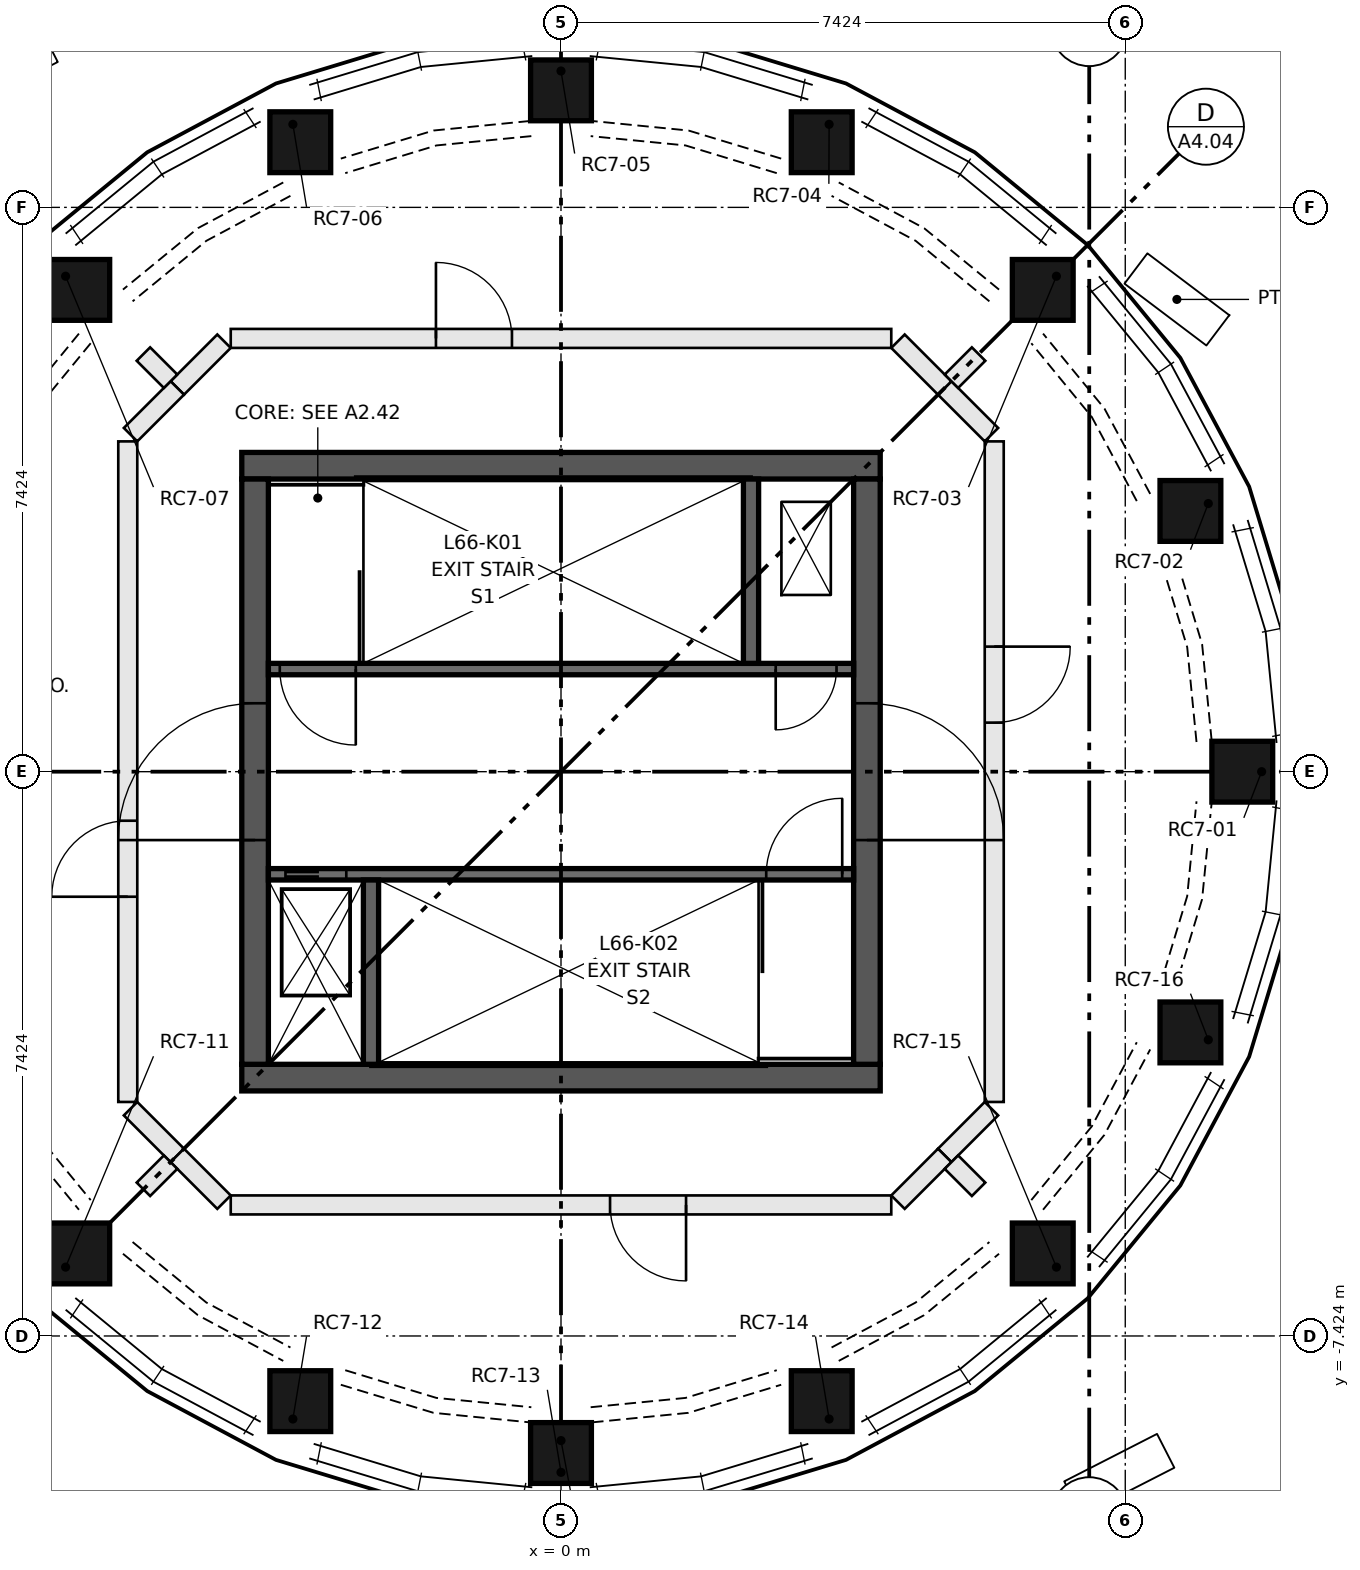
"""IFC4 building model, lengths in metres.
Left out: names, types, materials, properties, quantities, classifications, styles, units other than length and angle.
Written with IfcOpenShell. Run it as: python <this file> out.ifc"""

import sys

from ifc_helpers import new_model, si_unit, direction, frame, frame_2d, origin, origin_2d, place, context, subcontext, project, spatial, rectangle, extrude, element, fill, save


model = new_model("IFC4")
c1 = context("Model", 3, precision=1e-05, world=origin(), true_north=direction((0.0, 1.0)))
c2 = subcontext(c1, "Body", "Model", "MODEL_VIEW")
j1 = project(units=[si_unit("LENGTHUNIT", "METRE"), si_unit("PLANEANGLEUNIT", "RADIAN")], contexts=[c1])
p1 = place(None, origin())
s1 = spatial("IfcSite", under=j1, at=p1, CompositionType="ELEMENT")
p2 = place(p1, origin())
s2 = spatial("IfcBuilding", under=s1, at=p2, CompositionType="ELEMENT")
p3 = place(p2, frame((0.0, 0.0, 244.4)))
s3 = spatial("IfcBuildingStorey", under=s2, at=p3, CompositionType="ELEMENT", Elevation=244.4)
p4 = place(p3, frame((9.218, 0.0, 0.5), z_axis=(0.0, 0.0, 1.0), x_axis=(0.0, -1.0, 0.0)))
e1 = element("IfcColumn", 1, at=p4, inside=s3, PredefinedType="COLUMN", context=c2, shape_type="SweptSolid", body=[
    extrude(rectangle(XDim=0.8, YDim=0.8, at=origin_2d()), origin(), (0.0, -0.342, 0.94), 2.979),
])
p5 = place(p3, frame((8.517, 3.528, 0.5), z_axis=(0.0, 0.0, 1.0), x_axis=(0.38269062517, -0.923876553121, 0.0)))
e2 = element("IfcColumn", 2, at=p5, inside=s3, PredefinedType="COLUMN", context=c2, shape_type="SweptSolid", body=[
    extrude(rectangle(XDim=0.8, YDim=0.8, at=origin_2d()), origin(), (0.0, -0.342, 0.94), 2.979),
])
p6 = place(p3, frame((6.518, 6.518, 0.5), z_axis=(0.0, 0.0, 1.0), x_axis=(0.707106781187, -0.707106781187, 0.0)))
e3 = element("IfcColumn", 3, at=p6, inside=s3, PredefinedType="COLUMN", context=c2, shape_type="SweptSolid", body=[
    extrude(rectangle(XDim=0.8, YDim=0.8, at=origin_2d()), origin(), (0.0, -0.342, 0.94), 2.979),
])
p7 = place(p3, frame((3.528, 8.517, 0.5), z_axis=(0.0, 0.0, 1.0), x_axis=(0.923876553121, -0.38269062517, 0.0)))
e4 = element("IfcColumn", 4, at=p7, inside=s3, PredefinedType="COLUMN", context=c2, shape_type="SweptSolid", body=[
    extrude(rectangle(XDim=0.8, YDim=0.8, at=origin_2d()), origin(), (0.0, -0.342, 0.94), 2.979),
])
p8 = place(p3, frame((0.0, 9.218, 0.5), z_axis=(0.0, 0.0, 1.0), x_axis=(1.0, 0.0, 0.0)))
e5 = element("IfcColumn", 5, at=p8, inside=s3, PredefinedType="COLUMN", context=c2, shape_type="SweptSolid", body=[
    extrude(rectangle(XDim=0.8, YDim=0.8, at=origin_2d()), origin(), (0.0, -0.342, 0.94), 2.979),
])
p9 = place(p3, frame((-3.528, 8.517, 0.5), z_axis=(0.0, 0.0, 1.0), x_axis=(0.923876553121, 0.38269062517, 0.0)))
e6 = element("IfcColumn", 6, at=p9, inside=s3, PredefinedType="COLUMN", context=c2, shape_type="SweptSolid", body=[
    extrude(rectangle(XDim=0.8, YDim=0.8, at=origin_2d()), origin(), (0.0, -0.342, 0.94), 2.979),
])
for number, where, z_axis, x_axis in (
    (7, (-6.518, 6.518, 0.5), (0.0, 0.0, 1.0), (0.707, 0.707, 0.0)),
    (8, (-6.518, -6.518, 0.5), (0.0, 0.0, 1.0), (-0.707, 0.707, 0.0)),
):
    element("IfcColumn", number, at=place(p3, frame(where, z_axis=z_axis, x_axis=x_axis)), inside=s3, PredefinedType="COLUMN", context=c2, shape_type="SweptSolid", body=[
        extrude(rectangle(XDim=0.8, YDim=0.8, at=origin_2d()), origin(), (0.0, -0.342, 0.94), 2.979),
    ])
p10 = place(p3, frame((-3.528, -8.517, 0.5), z_axis=(0.0, 0.0, 1.0), x_axis=(-0.923876553121, 0.38269062517, 0.0)))
e9 = element("IfcColumn", 9, at=p10, inside=s3, PredefinedType="COLUMN", context=c2, shape_type="SweptSolid", body=[
    extrude(rectangle(XDim=0.8, YDim=0.8, at=origin_2d()), origin(), (0.0, -0.342, 0.94), 2.979),
])
p11 = place(p3, frame((0.0, -9.218, 0.5), z_axis=(0.0, 0.0, 1.0), x_axis=(-1.0, 0.0, 0.0)))
e10 = element("IfcColumn", 10, at=p11, inside=s3, PredefinedType="COLUMN", context=c2, shape_type="SweptSolid", body=[
    extrude(rectangle(XDim=0.8, YDim=0.8, at=origin_2d()), origin(), (0.0, -0.342, 0.94), 2.979),
])
p12 = place(p3, frame((3.528, -8.517, 0.5), z_axis=(0.0, 0.0, 1.0), x_axis=(-0.923876553121, -0.38269062517, 0.0)))
e11 = element("IfcColumn", 11, at=p12, inside=s3, PredefinedType="COLUMN", context=c2, shape_type="SweptSolid", body=[
    extrude(rectangle(XDim=0.8, YDim=0.8, at=origin_2d()), origin(), (0.0, -0.342, 0.94), 2.979),
])
p13 = place(p3, frame((6.518, -6.518, 0.5), z_axis=(0.0, 0.0, 1.0), x_axis=(-0.707106781187, -0.707106781187, 0.0)))
e12 = element("IfcColumn", 12, at=p13, inside=s3, PredefinedType="COLUMN", context=c2, shape_type="SweptSolid", body=[
    extrude(rectangle(XDim=0.8, YDim=0.8, at=origin_2d()), origin(), (0.0, -0.342, 0.94), 2.979),
])
p14 = place(p3, frame((8.517, -3.528, 0.5), z_axis=(0.0, 0.0, 1.0), x_axis=(-0.38269062517, -0.923876553121, 0.0)))
e13 = element("IfcColumn", 13, at=p14, inside=s3, PredefinedType="COLUMN", context=c2, shape_type="SweptSolid", body=[
    extrude(rectangle(XDim=0.8, YDim=0.8, at=origin_2d()), origin(), (0.0, -0.342, 0.94), 2.979),
])
for number, where, z_axis, x_axis in (
    (14, (-4.2, -4.025, 0.0), (0.0, 0.0, 1.0), (1.0, 0.0, 0.0)),
    (15, (-4.2, 4.025, 0.0), (0.0, 0.0, 1.0), (1.0, 0.0, 0.0)),
):
    element("IfcWall", number, at=place(p3, frame(where, z_axis=z_axis, x_axis=x_axis)), inside=s3, PredefinedType="SHEAR", context=c2, shape_type="SweptSolid", body=[
        extrude(rectangle(XDim=8.4, YDim=0.35, at=frame_2d((4.2, 0.0))), origin(), (0.0, 0.0, 1.0), 2.95),
    ])
p15 = place(p3, frame((-4.025, -3.85, 0.0), z_axis=(0.0, 0.0, 1.0), x_axis=(0.0, 1.0, 0.0)))
e16 = element("IfcWall", 16, at=p15, inside=s3, PredefinedType="SHEAR", context=c2, shape_type="SweptSolid", body=[
    extrude(rectangle(XDim=7.7, YDim=0.35, at=frame_2d((3.85, 0.0))), origin(), (0.0, 0.0, 1.0), 2.95),
])
p16 = place(p15, frame((2.95, 0.0, 0.0)))
e17 = element("IfcOpeningElement", 17, at=p16, cuts=e16, PredefinedType="OPENING", context=c2, shape_type="SweptSolid", body=[
    extrude(rectangle(XDim=1.8, YDim=2.1, at=frame_2d((0.9, 1.05))), frame((0.0, 0.185, 0.0), z_axis=(0.0, -1.0, 0.0), x_axis=(1.0, 0.0, 0.0)), (0.0, 0.0, 1.0), 0.37),
])
p17 = place(p3, frame((4.025, -3.85, 0.0), z_axis=(0.0, 0.0, 1.0), x_axis=(0.0, 1.0, 0.0)))
e18 = element("IfcWall", 18, at=p17, inside=s3, PredefinedType="SHEAR", context=c2, shape_type="SweptSolid", body=[
    extrude(rectangle(XDim=7.7, YDim=0.35, at=frame_2d((3.85, 0.0))), origin(), (0.0, 0.0, 1.0), 2.95),
])
p18 = place(p17, frame((2.95, 0.0, 0.0)))
e19 = element("IfcOpeningElement", 19, at=p18, cuts=e18, PredefinedType="OPENING", context=c2, shape_type="SweptSolid", body=[
    extrude(rectangle(XDim=1.8, YDim=2.1, at=frame_2d((0.9, 1.05))), frame((0.0, 0.185, 0.0), z_axis=(0.0, -1.0, 0.0), x_axis=(1.0, 0.0, 0.0)), (0.0, 0.0, 1.0), 0.37),
])
p19 = place(p3, frame((-3.85, 1.35, 0.0), z_axis=(0.0, 0.0, 1.0), x_axis=(1.0, 0.0, 0.0)))
e20 = element("IfcWall", 20, at=p19, inside=s3, PredefinedType="SHEAR", context=c2, shape_type="SweptSolid", body=[
    extrude(rectangle(XDim=7.7, YDim=0.15, at=frame_2d((3.85, 0.0))), origin(), (0.0, 0.0, 1.0), 2.95),
])
p20 = place(p19, frame((0.15, 0.0, 0.0)))
e21 = element("IfcOpeningElement", 21, at=p20, cuts=e20, PredefinedType="OPENING", context=c2, shape_type="SweptSolid", body=[
    extrude(rectangle(XDim=1.0, YDim=2.1, at=frame_2d((0.5, 1.05))), frame((0.0, 0.085, 0.0), z_axis=(0.0, -1.0, 0.0), x_axis=(1.0, 0.0, 0.0)), (0.0, 0.0, 1.0), 0.17),
])
p21 = place(p19, frame((6.675, 0.0, 0.0)))
e22 = element("IfcOpeningElement", 22, at=p21, cuts=e20, PredefinedType="OPENING", context=c2, shape_type="SweptSolid", body=[
    extrude(rectangle(XDim=0.8, YDim=2.1, at=frame_2d((0.4, 1.05))), frame((0.0, 0.085, 0.0), z_axis=(0.0, -1.0, 0.0), x_axis=(1.0, 0.0, 0.0)), (0.0, 0.0, 1.0), 0.17),
])
p22 = place(p3, frame((-3.85, -1.35, 0.0), z_axis=(0.0, 0.0, 1.0), x_axis=(1.0, 0.0, 0.0)))
e23 = element("IfcWall", 23, at=p22, inside=s3, PredefinedType="SHEAR", context=c2, shape_type="SweptSolid", body=[
    extrude(rectangle(XDim=7.7, YDim=0.15, at=frame_2d((3.85, 0.0))), origin(), (0.0, 0.0, 1.0), 2.95),
])
p23 = place(p22, frame((0.225, 0.0, 0.0)))
e24 = element("IfcOpeningElement", 24, at=p23, cuts=e23, PredefinedType="OPENING", context=c2, shape_type="SweptSolid", body=[
    extrude(rectangle(XDim=0.8, YDim=2.1, at=frame_2d((0.4, 1.05))), frame((0.0, 0.085, 0.0), z_axis=(0.0, -1.0, 0.0), x_axis=(1.0, 0.0, 0.0)), (0.0, 0.0, 1.0), 0.17),
])
p24 = place(p22, frame((6.55, 0.0, 0.0)))
e25 = element("IfcOpeningElement", 25, at=p24, cuts=e23, PredefinedType="OPENING", context=c2, shape_type="SweptSolid", body=[
    extrude(rectangle(XDim=1.0, YDim=2.1, at=frame_2d((0.5, 1.05))), frame((0.0, 0.085, 0.0), z_axis=(0.0, -1.0, 0.0), x_axis=(1.0, 0.0, 0.0)), (0.0, 0.0, 1.0), 0.17),
])
for number, where, z_axis, x_axis in (
    (26, (2.5, 1.425, 0.0), (0.0, 0.0, 1.0), (0.0, 1.0, 0.0)),
    (27, (-2.5, -1.425, 0.0), (0.0, 0.0, 1.0), (0.0, -1.0, 0.0)),
):
    element("IfcWall", number, at=place(p3, frame(where, z_axis=z_axis, x_axis=x_axis)), inside=s3, PredefinedType="SHEAR", context=c2, shape_type="SweptSolid", body=[
        extrude(rectangle(XDim=2.425, YDim=0.2, at=frame_2d((1.212, 0.0))), origin(), (0.0, 0.0, 1.0), 2.95),
    ])
for number, where, z_axis, x_axis in (
    (28, (5.049, 5.049, 0.0), (0.0, 0.0, 1.0), (0.707, -0.707, 0.0)),
    (29, (5.663, -4.434, 0.0), (0.0, 0.0, 1.0), (-0.707, -0.707, 0.0)),
):
    element("IfcWall", number, at=place(p3, frame(where, z_axis=z_axis, x_axis=x_axis)), inside=s3, PredefinedType="PARTITIONING", context=c2, shape_type="SweptSolid", body=[
        extrude(rectangle(XDim=0.87, YDim=0.25, at=frame_2d((0.435, 0.0))), origin(), (0.0, 0.0, 1.0), 2.95),
    ])
p25 = place(p3, frame((5.7, 4.345, 0.0), z_axis=(0.0, 0.0, 1.0), x_axis=(0.0, -1.0, 0.0)))
e30 = element("IfcWall", 30, at=p25, inside=s3, PredefinedType="PARTITIONING", context=c2, shape_type="SweptSolid", body=[
    extrude(rectangle(XDim=8.69, YDim=0.25, at=frame_2d((4.345, 0.0))), origin(), (0.0, 0.0, 1.0), 2.95),
])
p26 = place(p25, frame((2.7, 0.0, 0.0)))
e31 = element("IfcOpeningElement", 31, at=p26, cuts=e30, PredefinedType="OPENING", context=c2, shape_type="SweptSolid", body=[
    extrude(rectangle(XDim=1.0, YDim=2.1, at=frame_2d((0.5, 1.05))), frame((0.0, 0.135, 0.0), z_axis=(0.0, -1.0, 0.0), x_axis=(1.0, 0.0, 0.0)), (0.0, 0.0, 1.0), 0.27),
])
p27 = place(p3, frame((-5.049, 5.049, 0.0), z_axis=(0.0, 0.0, 1.0), x_axis=(0.707247149774, 0.706966384729, 0.0)))
e32 = element("IfcWall", 32, at=p27, inside=s3, PredefinedType="PARTITIONING", context=c2, shape_type="SweptSolid", body=[
    extrude(rectangle(XDim=0.87, YDim=0.25, at=frame_2d((0.435, 0.0))), origin(), (0.0, 0.0, 1.0), 2.95),
])
p28 = place(p3, frame((-4.345, 5.7, 0.0), z_axis=(0.0, 0.0, 1.0), x_axis=(1.0, 0.0, 0.0)))
e33 = element("IfcWall", 33, at=p28, inside=s3, PredefinedType="PARTITIONING", context=c2, shape_type="SweptSolid", body=[
    extrude(rectangle(XDim=8.69, YDim=0.25, at=frame_2d((4.345, 0.0))), origin(), (0.0, 0.0, 1.0), 2.95),
])
p29 = place(p28, frame((2.7, 0.0, 0.0)))
e34 = element("IfcOpeningElement", 34, at=p29, cuts=e33, PredefinedType="OPENING", context=c2, shape_type="SweptSolid", body=[
    extrude(rectangle(XDim=1.0, YDim=2.1, at=frame_2d((0.5, 1.05))), frame((0.0, 0.135, 0.0), z_axis=(0.0, -1.0, 0.0), x_axis=(1.0, 0.0, 0.0)), (0.0, 0.0, 1.0), 0.27),
])
p30 = place(p3, frame((4.434, 5.663, 0.0), z_axis=(0.0, 0.0, 1.0), x_axis=(0.707247149774, -0.706966384729, 0.0)))
e35 = element("IfcWall", 35, at=p30, inside=s3, PredefinedType="PARTITIONING", context=c2, shape_type="SweptSolid", body=[
    extrude(rectangle(XDim=0.87, YDim=0.25, at=frame_2d((0.435, 0.0))), origin(), (0.0, 0.0, 1.0), 2.95),
])
p31 = place(p3, frame((-5.7, -4.345, 0.0), z_axis=(0.0, 0.0, 1.0), x_axis=(0.0, 1.0, 0.0)))
e36 = element("IfcWall", 36, at=p31, inside=s3, PredefinedType="PARTITIONING", context=c2, shape_type="SweptSolid", body=[
    extrude(rectangle(XDim=8.69, YDim=0.25, at=frame_2d((4.345, 0.0))), origin(), (0.0, 0.0, 1.0), 2.95),
])
p32 = place(p31, frame((2.7, 0.0, 0.0)))
e37 = element("IfcOpeningElement", 37, at=p32, cuts=e36, PredefinedType="OPENING", context=c2, shape_type="SweptSolid", body=[
    extrude(rectangle(XDim=1.0, YDim=2.1, at=frame_2d((0.5, 1.05))), frame((0.0, 0.135, 0.0), z_axis=(0.0, -1.0, 0.0), x_axis=(1.0, 0.0, 0.0)), (0.0, 0.0, 1.0), 0.27),
])
for number, where, z_axis, x_axis in (
    (38, (-5.663, 4.434, 0.0), (0.0, 0.0, 1.0), (0.707, 0.707, 0.0)),
    (39, (-5.049, -5.049, 0.0), (0.0, 0.0, 1.0), (-0.707, 0.707, 0.0)),
    (40, (-4.434, -5.663, 0.0), (0.0, 0.0, 1.0), (-0.707, 0.707, 0.0)),
):
    element("IfcWall", number, at=place(p3, frame(where, z_axis=z_axis, x_axis=x_axis)), inside=s3, PredefinedType="PARTITIONING", context=c2, shape_type="SweptSolid", body=[
        extrude(rectangle(XDim=0.87, YDim=0.25, at=frame_2d((0.435, 0.0))), origin(), (0.0, 0.0, 1.0), 2.95),
    ])
p33 = place(p3, frame((4.345, -5.7, 0.0), z_axis=(0.0, 0.0, 1.0), x_axis=(-1.0, 0.0, 0.0)))
e41 = element("IfcWall", 41, at=p33, inside=s3, PredefinedType="PARTITIONING", context=c2, shape_type="SweptSolid", body=[
    extrude(rectangle(XDim=8.69, YDim=0.25, at=frame_2d((4.345, 0.0))), origin(), (0.0, 0.0, 1.0), 2.95),
])
p34 = place(p33, frame((2.7, 0.0, 0.0)))
e42 = element("IfcOpeningElement", 42, at=p34, cuts=e41, PredefinedType="OPENING", context=c2, shape_type="SweptSolid", body=[
    extrude(rectangle(XDim=1.0, YDim=2.1, at=frame_2d((0.5, 1.05))), frame((0.0, 0.135, 0.0), z_axis=(0.0, -1.0, 0.0), x_axis=(1.0, 0.0, 0.0)), (0.0, 0.0, 1.0), 0.27),
])
p35 = place(p3, frame((5.049, -5.049, 0.0), z_axis=(0.0, 0.0, 1.0), x_axis=(-0.707247149774, -0.706966384729, 0.0)))
e43 = element("IfcWall", 43, at=p35, inside=s3, PredefinedType="PARTITIONING", context=c2, shape_type="SweptSolid", body=[
    extrude(rectangle(XDim=0.87, YDim=0.25, at=frame_2d((0.435, 0.0))), origin(), (0.0, 0.0, 1.0), 2.95),
])
for number, where, z_axis, x_axis in (
    (44, (5.137, 5.137, 0.0), (0.0, 0.0, 1.0), (0.707, 0.707, 0.0)),
    (45, (5.494, -5.494, 0.0), (0.0, 0.0, 1.0), (-0.707, 0.707, 0.0)),
    (46, (-5.137, 5.137, 0.0), (0.0, 0.0, 1.0), (-0.707, 0.707, 0.0)),
    (47, (-5.137, -5.137, 0.0), (0.0, 0.0, 1.0), (-0.707, -0.707, 0.0)),
):
    element("IfcWall", number, at=place(p3, frame(where, z_axis=z_axis, x_axis=x_axis)), inside=s3, PredefinedType="PARTITIONING", context=c2, shape_type="SweptSolid", body=[
        extrude(rectangle(XDim=0.505, YDim=0.25, at=frame_2d((0.252, 0.0))), origin(), (0.0, 0.0, 1.0), 2.95),
    ])
p36 = place(p23, origin())
e48 = element("IfcDoor", 48, at=p36, inside=s3, OperationType="DOUBLE_DOOR_SLIDING", PredefinedType="DOOR", context=c2, shape_type="SweptSolid", body=[
    extrude(rectangle(XDim=0.8, YDim=2.1, at=frame_2d((0.4, 1.05))), frame((0.0, 0.025, 0.0), z_axis=(0.0, -1.0, 0.0), x_axis=(1.0, 0.0, 0.0)), (0.0, 0.0, 1.0), 0.05),
])
fill(e24, e48)
p37 = place(p20, frame((1.0, 0.0, 0.0), z_axis=(0.0, 0.0, 1.0), x_axis=(-1.0, 0.0, 0.0)))
e49 = element("IfcDoor", 49, at=p37, inside=s3, OperationType="SINGLE_SWING_RIGHT", PredefinedType="DOOR", context=c2, shape_type="SweptSolid", body=[
    extrude(rectangle(XDim=1.0, YDim=2.1, at=frame_2d((0.5, 1.05))), frame((0.0, 0.025, 0.0), z_axis=(0.0, -1.0, 0.0), x_axis=(1.0, 0.0, 0.0)), (0.0, 0.0, 1.0), 0.05),
])
fill(e21, e49)
p38 = place(p24, origin())
e50 = element("IfcDoor", 50, at=p38, inside=s3, OperationType="SINGLE_SWING_RIGHT", PredefinedType="DOOR", context=c2, shape_type="SweptSolid", body=[
    extrude(rectangle(XDim=1.0, YDim=2.1, at=frame_2d((0.5, 1.05))), frame((0.0, 0.025, 0.0), z_axis=(0.0, -1.0, 0.0), x_axis=(1.0, 0.0, 0.0)), (0.0, 0.0, 1.0), 0.05),
])
fill(e25, e50)
p39 = place(p21, frame((0.8, 0.0, 0.0), z_axis=(0.0, 0.0, 1.0), x_axis=(-1.0, 0.0, 0.0)))
e51 = element("IfcDoor", 51, at=p39, inside=s3, OperationType="SINGLE_SWING_LEFT", PredefinedType="DOOR", context=c2, shape_type="SweptSolid", body=[
    extrude(rectangle(XDim=0.8, YDim=2.1, at=frame_2d((0.4, 1.05))), frame((0.0, 0.025, 0.0), z_axis=(0.0, -1.0, 0.0), x_axis=(1.0, 0.0, 0.0)), (0.0, 0.0, 1.0), 0.05),
])
fill(e22, e51)
p40 = place(p16, origin())
e52 = element("IfcDoor", 52, at=p40, inside=s3, OperationType="DOUBLE_DOOR_SINGLE_SWING", PredefinedType="DOOR", context=c2, shape_type="SweptSolid", body=[
    extrude(rectangle(XDim=1.8, YDim=2.1, at=frame_2d((0.9, 1.05))), frame((0.0, 0.025, 0.0), z_axis=(0.0, -1.0, 0.0), x_axis=(1.0, 0.0, 0.0)), (0.0, 0.0, 1.0), 0.05),
])
fill(e17, e52)
p41 = place(p18, frame((1.8, 0.0, 0.0), z_axis=(0.0, 0.0, 1.0), x_axis=(-1.0, 0.0, 0.0)))
e53 = element("IfcDoor", 53, at=p41, inside=s3, OperationType="DOUBLE_DOOR_SINGLE_SWING", PredefinedType="DOOR", context=c2, shape_type="SweptSolid", body=[
    extrude(rectangle(XDim=1.8, YDim=2.1, at=frame_2d((0.9, 1.05))), frame((0.0, 0.025, 0.0), z_axis=(0.0, -1.0, 0.0), x_axis=(1.0, 0.0, 0.0)), (0.0, 0.0, 1.0), 0.05),
])
fill(e19, e53)
p42 = place(p26, origin())
e54 = element("IfcDoor", 54, at=p42, inside=s3, OperationType="SINGLE_SWING_LEFT", PredefinedType="DOOR", context=c2, shape_type="SweptSolid", body=[
    extrude(rectangle(XDim=1.0, YDim=2.1, at=frame_2d((0.5, 1.05))), frame((0.0, 0.025, 0.0), z_axis=(0.0, -1.0, 0.0), x_axis=(1.0, 0.0, 0.0)), (0.0, 0.0, 1.0), 0.05),
])
fill(e31, e54)
p43 = place(p29, origin())
e55 = element("IfcDoor", 55, at=p43, inside=s3, OperationType="SINGLE_SWING_LEFT", PredefinedType="DOOR", context=c2, shape_type="SweptSolid", body=[
    extrude(rectangle(XDim=1.0, YDim=2.1, at=frame_2d((0.5, 1.05))), frame((0.0, 0.025, 0.0), z_axis=(0.0, -1.0, 0.0), x_axis=(1.0, 0.0, 0.0)), (0.0, 0.0, 1.0), 0.05),
])
fill(e34, e55)
p44 = place(p32, origin())
e56 = element("IfcDoor", 56, at=p44, inside=s3, OperationType="SINGLE_SWING_LEFT", PredefinedType="DOOR", context=c2, shape_type="SweptSolid", body=[
    extrude(rectangle(XDim=1.0, YDim=2.1, at=frame_2d((0.5, 1.05))), frame((0.0, 0.025, 0.0), z_axis=(0.0, -1.0, 0.0), x_axis=(1.0, 0.0, 0.0)), (0.0, 0.0, 1.0), 0.05),
])
fill(e37, e56)
p45 = place(p34, origin())
e57 = element("IfcDoor", 57, at=p45, inside=s3, OperationType="SINGLE_SWING_LEFT", PredefinedType="DOOR", context=c2, shape_type="SweptSolid", body=[
    extrude(rectangle(XDim=1.0, YDim=2.1, at=frame_2d((0.5, 1.05))), frame((0.0, 0.025, 0.0), z_axis=(0.0, -1.0, 0.0), x_axis=(1.0, 0.0, 0.0)), (0.0, 0.0, 1.0), 0.05),
])
fill(e42, e57)
save(model, sys.argv[1])
